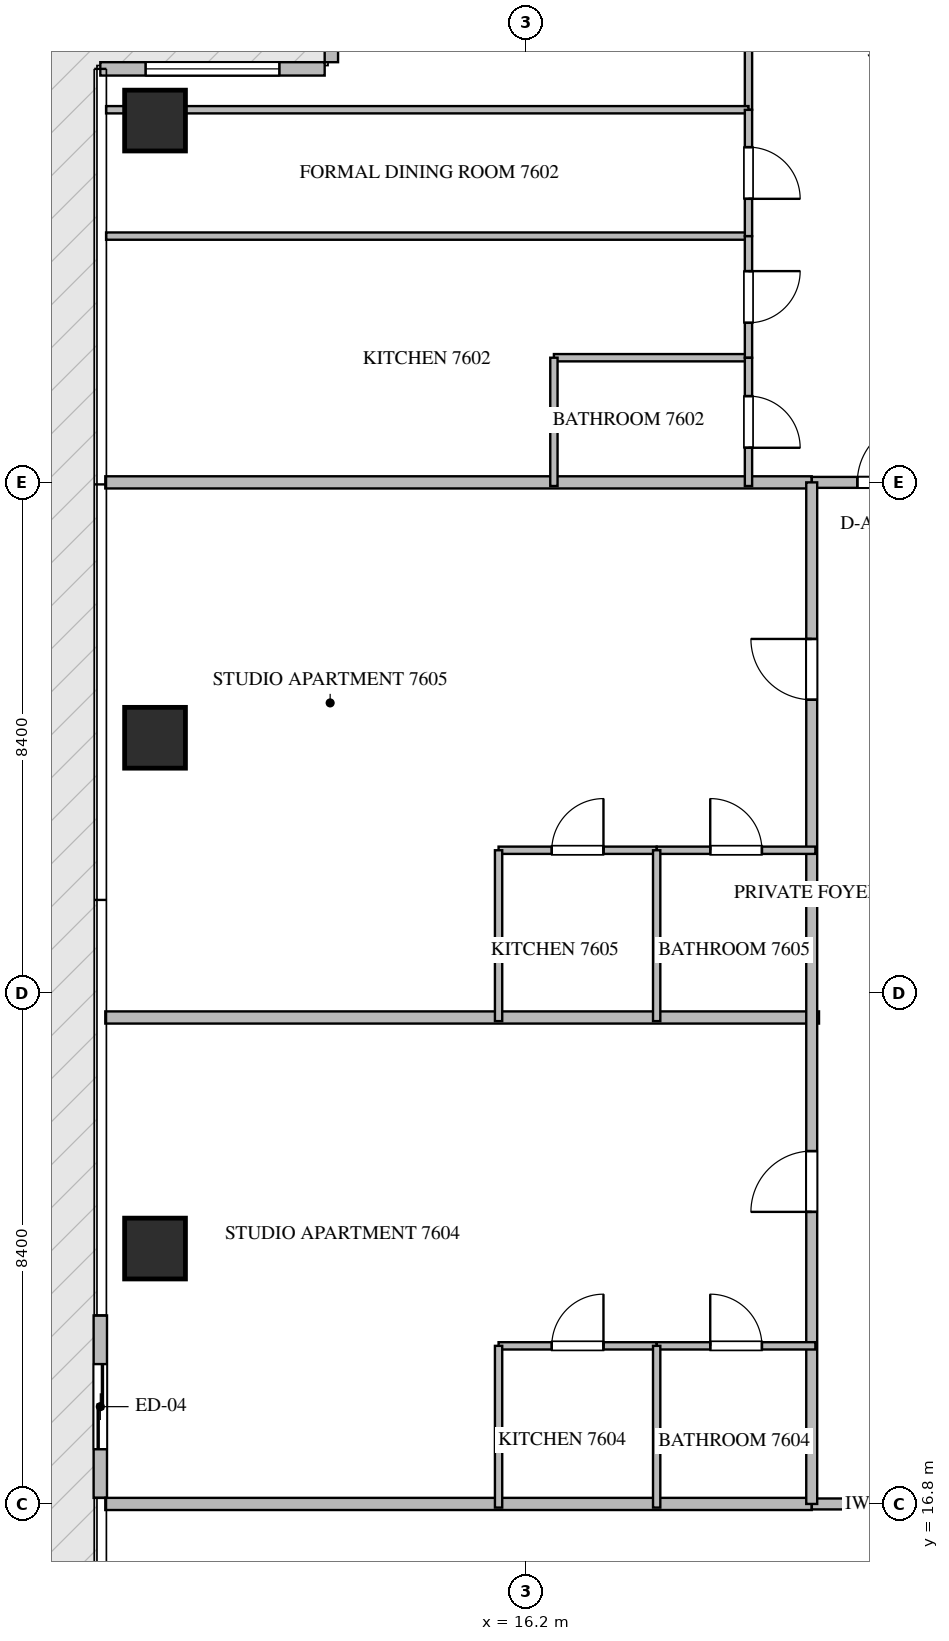
"""IFC4 building model, lengths in metres.
Left out: names, types, materials, properties, quantities, classifications, styles, units other than length and angle.
Written with IfcOpenShell. Run it as: python <this file> out.ifc"""

import sys

from ifc_helpers import new_model, si_unit, direction, frame, frame_2d, origin, origin_2d, place, context, subcontext, project, spatial, rectangle, extrude, source, transform, mapped, element, fill, save


model = new_model("IFC4")
c1 = context("Model", 3, precision=1e-05, world=origin(), true_north=direction((0.0, 1.0)))
c2 = subcontext(c1, "Body", "Model", "MODEL_VIEW")
j1 = project(units=[si_unit("LENGTHUNIT", "METRE"), si_unit("PLANEANGLEUNIT", "RADIAN")], contexts=[c1])
p1 = place(None, origin())
s1 = spatial("IfcSite", under=j1, at=p1, CompositionType="ELEMENT")
p2 = place(p1, origin())
s2 = spatial("IfcBuilding", under=s1, at=p2, CompositionType="ELEMENT")
p3 = place(p2, frame((0.0, 0.0, 305.6)))
s3 = spatial("IfcBuildingStorey", under=s2, at=p3, CompositionType="ELEMENT", Elevation=305.6)
m1 = source(origin(), c2, "Body", "SweptSolid", [
    extrude(rectangle(XDim=1.0, YDim=1.0, at=origin_2d()), origin(), (0.0, 0.0, 1.0), 4.05),
])
for number, where, z_axis, x_axis in (
    (1, (10.1, 21.0, -0.26), (0.0, 0.0, 1.0), (1.0, 0.0, 0.0)),
    (2, (10.1, 29.4, -0.26), (0.0, 0.0, 1.0), (1.0, 0.0, 0.0)),
    (3, (10.1, 39.55, -0.26), (0.0, 0.0, 1.0), (1.0, 0.0, 0.0)),
):
    element("IfcColumn", number, at=place(p3, frame(where, z_axis=z_axis, x_axis=x_axis)), inside=s3, PredefinedType="COLUMN", context=c2, shape_type="MappedRepresentation", body=[
        mapped(m1, transform((0.0, 0.0, 0.0), scale=1.0)),
    ])
p4 = place(p3, frame((13.0, 44.09, 0.0), z_axis=(0.0, 0.0, 1.0), x_axis=(0.0, -1.0, 0.0)))
e4 = element("IfcWall", 4, at=p4, inside=s3, PredefinedType="ELEMENTEDWALL", context=c2, shape_type="SweptSolid", body=[
    extrude(rectangle(XDim=3.58, YDim=0.22, at=frame_2d((1.79, 0.0))), origin(), (0.0, 0.0, 1.0), 3.775),
])
p5 = place(p4, frame((0.69, 0.0, 0.65)))
e5 = element("IfcOpeningElement", 5, at=p5, cuts=e4, PredefinedType="OPENING", context=c2, shape_type="SweptSolid", body=[
    extrude(rectangle(XDim=2.2, YDim=2.4, at=frame_2d((1.1, 1.2))), frame((0.0, 0.12, 0.0), z_axis=(0.0, -1.0, 0.0), x_axis=(1.0, 0.0, 0.0)), (0.0, 0.0, 1.0), 0.24),
])
p6 = place(p3, frame((12.89, 40.4, 0.0), z_axis=(0.0, 0.0, 1.0), x_axis=(-1.0, 0.0, 0.0)))
e6 = element("IfcWall", 6, at=p6, inside=s3, PredefinedType="ELEMENTEDWALL", context=c2, shape_type="SweptSolid", body=[
    extrude(rectangle(XDim=3.69, YDim=0.22, at=frame_2d((1.845, 0.0))), origin(), (0.0, 0.0, 1.0), 3.775),
])
p7 = place(p6, frame((0.745, 0.0, 0.65)))
e7 = element("IfcOpeningElement", 7, at=p7, cuts=e6, PredefinedType="OPENING", context=c2, shape_type="SweptSolid", body=[
    extrude(rectangle(XDim=2.2, YDim=2.4, at=frame_2d((1.1, 1.2))), frame((0.0, 0.12, 0.0), z_axis=(0.0, -1.0, 0.0), x_axis=(1.0, 0.0, 0.0)), (0.0, 0.0, 1.0), 0.24),
])
p8 = place(p3, frame((9.2, 19.9, 0.0), z_axis=(0.0, 0.0, 1.0), x_axis=(0.0, -1.0, 0.0)))
e8 = element("IfcWall", 8, at=p8, inside=s3, PredefinedType="ELEMENTEDWALL", context=c2, shape_type="SweptSolid", body=[
    extrude(rectangle(XDim=3.0, YDim=0.22, at=frame_2d((1.5, 0.0))), origin(), (0.0, 0.0, 1.0), 3.775),
])
p9 = place(p8, frame((0.8, 0.0, 0.0)))
e9 = element("IfcOpeningElement", 9, at=p9, cuts=e8, PredefinedType="OPENING", context=c2, shape_type="SweptSolid", body=[
    extrude(rectangle(XDim=1.4, YDim=2.25, at=frame_2d((0.7, 1.125))), frame((0.0, 0.12, 0.0), z_axis=(0.0, -1.0, 0.0), x_axis=(1.0, 0.0, 0.0)), (0.0, 0.0, 1.0), 0.24),
])
p10 = place(p3, frame((9.282, 24.8, 0.0), z_axis=(0.0, 0.0, 1.0), x_axis=(1.0, 0.0, 0.0)))
e10 = element("IfcWall", 10, at=p10, inside=s3, PredefinedType="PARTITIONING", context=c2, shape_type="SweptSolid", body=[
    extrude(rectangle(XDim=11.738, YDim=0.2, at=frame_2d((5.869, 0.0))), origin(), (0.0, 0.0, 1.0), 3.79),
])
for number, where, z_axis, x_axis in (
    (11, (9.282, 16.8, 0.0), (0.0, 0.0, 1.0), (1.0, 0.0, 0.0)),
    (12, (9.282, 33.6, 0.0), (0.0, 0.0, 1.0), (1.0, 0.0, 0.0)),
):
    element("IfcWall", number, at=place(p3, frame(where, z_axis=z_axis, x_axis=x_axis)), inside=s3, PredefinedType="PARTITIONING", context=c2, shape_type="SweptSolid", body=[
        extrude(rectangle(XDim=11.618, YDim=0.2, at=frame_2d((5.809, 0.0))), origin(), (0.0, 0.0, 1.0), 3.79),
    ])
p11 = place(p3, frame((20.902, 16.8, 0.0), z_axis=(0.0, 0.0, 1.0), x_axis=(1.0, 0.0, 0.0)))
e13 = element("IfcWall", 13, at=p11, inside=s3, PredefinedType="PARTITIONING", context=c2, shape_type="SweptSolid", body=[
    extrude(rectangle(XDim=2.496, YDim=0.18, at=frame_2d((1.248, 0.0))), origin(), (0.0, 0.0, 1.0), 3.79),
])
p12 = place(p3, frame((20.902, 33.6, 0.0), z_axis=(0.0, 0.0, 1.0), x_axis=(1.0, 0.0, 0.0)))
e14 = element("IfcWall", 14, at=p12, inside=s3, PredefinedType="PARTITIONING", context=c2, shape_type="SweptSolid", body=[
    extrude(rectangle(XDim=2.496, YDim=0.18, at=frame_2d((1.248, 0.0))), origin(), (0.0, 0.0, 1.0), 3.79),
])
p13 = place(p12, frame((0.748, 0.0, 0.0)))
e15 = element("IfcOpeningElement", 15, at=p13, cuts=e14, PredefinedType="OPENING", context=c2, shape_type="SweptSolid", body=[
    extrude(rectangle(XDim=1.0, YDim=2.15, at=frame_2d((0.5, 1.075))), frame((0.0, 0.1, 0.0), z_axis=(0.0, -1.0, 0.0), x_axis=(1.0, 0.0, 0.0)), (0.0, 0.0, 1.0), 0.2),
])
p14 = place(p3, frame((20.9, 16.8, 0.0), z_axis=(0.0, 0.0, 1.0), x_axis=(0.0, 1.0, 0.0)))
e16 = element("IfcWall", 16, at=p14, inside=s3, PredefinedType="PARTITIONING", context=c2, shape_type="SweptSolid", body=[
    extrude(rectangle(XDim=16.8, YDim=0.18, at=frame_2d((8.4, 0.0))), origin(), (0.0, 0.0, 1.0), 3.79),
])
p15 = place(p14, frame((4.803, 0.0, 0.0)))
e17 = element("IfcOpeningElement", 17, at=p15, cuts=e16, PredefinedType="OPENING", context=c2, shape_type="SweptSolid", body=[
    extrude(rectangle(XDim=1.0, YDim=2.15, at=frame_2d((0.5, 1.075))), frame((0.0, 0.1, 0.0), z_axis=(0.0, -1.0, 0.0), x_axis=(1.0, 0.0, 0.0)), (0.0, 0.0, 1.0), 0.2),
])
p16 = place(p14, frame((13.225, 0.0, 0.0)))
e18 = element("IfcOpeningElement", 18, at=p16, cuts=e16, PredefinedType="OPENING", context=c2, shape_type="SweptSolid", body=[
    extrude(rectangle(XDim=1.0, YDim=2.15, at=frame_2d((0.5, 1.075))), frame((0.0, 0.1, 0.0), z_axis=(0.0, -1.0, 0.0), x_axis=(1.0, 0.0, 0.0)), (0.0, 0.0, 1.0), 0.2),
])
p17 = place(p3, frame((19.86, 47.905, 0.0), z_axis=(0.0, 0.0, 1.0), x_axis=(0.0, -1.0, 0.0)))
e19 = element("IfcWall", 19, at=p17, inside=s3, PredefinedType="PARTITIONING", context=c2, shape_type="SweptSolid", body=[
    extrude(rectangle(XDim=8.177, YDim=0.12, at=frame_2d((4.088, 0.0))), origin(), (0.0, 0.0, 1.0), 3.79),
])
p18 = place(p17, frame((4.002, 0.0, 0.0)))
e20 = element("IfcOpeningElement", 20, at=p18, cuts=e19, PredefinedType="OPENING", context=c2, shape_type="SweptSolid", body=[
    extrude(rectangle(XDim=0.9, YDim=2.1, at=frame_2d((0.45, 1.05))), frame((0.0, 0.07, 0.0), z_axis=(0.0, -1.0, 0.0), x_axis=(1.0, 0.0, 0.0)), (0.0, 0.0, 1.0), 0.14),
])
p19 = place(p3, frame((9.295, 39.728, 0.0), z_axis=(0.0, 0.0, 1.0), x_axis=(1.0, 0.0, 0.0)))
e21 = element("IfcWall", 21, at=p19, inside=s3, PredefinedType="PARTITIONING", context=c2, shape_type="SweptSolid", body=[
    extrude(rectangle(XDim=10.565, YDim=0.12, at=frame_2d((5.283, 0.0))), origin(), (0.0, 0.0, 1.0), 3.292),
])
p20 = place(p3, frame((9.295, 37.65, 0.0), z_axis=(0.0, 0.0, 1.0), x_axis=(1.0, 0.0, 0.0)))
e22 = element("IfcWall", 22, at=p20, inside=s3, PredefinedType="PARTITIONING", context=c2, shape_type="SweptSolid", body=[
    extrude(rectangle(XDim=10.565, YDim=0.12, at=frame_2d((5.283, 0.0))), origin(), (0.0, 0.0, 1.0), 3.79),
])
p21 = place(p3, frame((16.66, 35.65, 0.0), z_axis=(0.0, 0.0, 1.0), x_axis=(1.0, 0.0, 0.0)))
e23 = element("IfcWall", 23, at=p21, inside=s3, PredefinedType="PARTITIONING", context=c2, shape_type="SweptSolid", body=[
    extrude(rectangle(XDim=3.2, YDim=0.12, at=frame_2d((1.6, 0.0))), origin(), (0.0, 0.0, 1.0), 3.79),
])
p22 = place(p3, frame((16.66, 35.65, 0.0), z_axis=(0.0, 0.0, 1.0), x_axis=(0.0, -1.0, 0.0)))
e24 = element("IfcWall", 24, at=p22, inside=s3, PredefinedType="PARTITIONING", context=c2, shape_type="SweptSolid", body=[
    extrude(rectangle(XDim=2.11, YDim=0.12, at=frame_2d((1.055, 0.0))), origin(), (0.0, 0.0, 1.0), 3.79),
])
p23 = place(p3, frame((19.86, 39.726, 0.0), z_axis=(0.0, 0.0, 1.0), x_axis=(0.0, -1.0, 0.0)))
e25 = element("IfcWall", 25, at=p23, inside=s3, PredefinedType="PARTITIONING", context=c2, shape_type="SweptSolid", body=[
    extrude(rectangle(XDim=2.076, YDim=0.12, at=frame_2d((1.038, 0.0))), origin(), (0.0, 0.0, 1.0), 3.79),
])
p24 = place(p23, frame((0.613, 0.0, 0.0)))
e26 = element("IfcOpeningElement", 26, at=p24, cuts=e25, PredefinedType="OPENING", context=c2, shape_type="SweptSolid", body=[
    extrude(rectangle(XDim=0.85, YDim=2.1, at=frame_2d((0.425, 1.05))), frame((0.0, 0.07, 0.0), z_axis=(0.0, -1.0, 0.0), x_axis=(1.0, 0.0, 0.0)), (0.0, 0.0, 1.0), 0.14),
])
p25 = place(p3, frame((19.86, 37.648, 0.0), z_axis=(0.0, 0.0, 1.0), x_axis=(0.0, -1.0, 0.0)))
e27 = element("IfcWall", 27, at=p25, inside=s3, PredefinedType="PARTITIONING", context=c2, shape_type="SweptSolid", body=[
    extrude(rectangle(XDim=1.998, YDim=0.12, at=frame_2d((0.999, 0.0))), origin(), (0.0, 0.0, 1.0), 3.79),
])
p26 = place(p25, frame((0.574, 0.0, 0.0)))
e28 = element("IfcOpeningElement", 28, at=p26, cuts=e27, PredefinedType="OPENING", context=c2, shape_type="SweptSolid", body=[
    extrude(rectangle(XDim=0.85, YDim=2.1, at=frame_2d((0.425, 1.05))), frame((0.0, 0.07, 0.0), z_axis=(0.0, -1.0, 0.0), x_axis=(1.0, 0.0, 0.0)), (0.0, 0.0, 1.0), 0.14),
])
p27 = place(p3, frame((19.86, 35.648, 0.0), z_axis=(0.0, 0.0, 1.0), x_axis=(0.0, -1.0, 0.0)))
e29 = element("IfcWall", 29, at=p27, inside=s3, PredefinedType="PARTITIONING", context=c2, shape_type="SweptSolid", body=[
    extrude(rectangle(XDim=2.108, YDim=0.12, at=frame_2d((1.054, 0.0))), origin(), (0.0, 0.0, 1.0), 3.79),
])
p28 = place(p27, frame((0.629, 0.0, 0.0)))
e30 = element("IfcOpeningElement", 30, at=p28, cuts=e29, PredefinedType="OPENING", context=c2, shape_type="SweptSolid", body=[
    extrude(rectangle(XDim=0.85, YDim=2.1, at=frame_2d((0.425, 1.05))), frame((0.0, 0.07, 0.0), z_axis=(0.0, -1.0, 0.0), x_axis=(1.0, 0.0, 0.0)), (0.0, 0.0, 1.0), 0.14),
])
p29 = place(p3, frame((15.75, 19.4, 0.0), z_axis=(0.0, 0.0, 1.0), x_axis=(1.0, 0.0, 0.0)))
e31 = element("IfcWall", 31, at=p29, inside=s3, PredefinedType="PARTITIONING", context=c2, shape_type="SweptSolid", body=[
    extrude(rectangle(XDim=2.6, YDim=0.12, at=frame_2d((1.3, 0.0))), origin(), (0.0, 0.0, 1.0), 3.79),
])
p30 = place(p29, frame((0.875, 0.0, 0.0)))
e32 = element("IfcOpeningElement", 32, at=p30, cuts=e31, PredefinedType="OPENING", context=c2, shape_type="SweptSolid", body=[
    extrude(rectangle(XDim=0.85, YDim=2.1, at=frame_2d((0.425, 1.05))), frame((0.0, 0.07, 0.0), z_axis=(0.0, -1.0, 0.0), x_axis=(1.0, 0.0, 0.0)), (0.0, 0.0, 1.0), 0.14),
])
p31 = place(p3, frame((18.352, 19.4, 0.0), z_axis=(0.0, 0.0, 1.0), x_axis=(1.0, 0.0, 0.0)))
e33 = element("IfcWall", 33, at=p31, inside=s3, PredefinedType="PARTITIONING", context=c2, shape_type="SweptSolid", body=[
    extrude(rectangle(XDim=2.608, YDim=0.12, at=frame_2d((1.304, 0.0))), origin(), (0.0, 0.0, 1.0), 3.79),
])
p32 = place(p31, frame((0.879, 0.0, 0.0)))
e34 = element("IfcOpeningElement", 34, at=p32, cuts=e33, PredefinedType="OPENING", context=c2, shape_type="SweptSolid", body=[
    extrude(rectangle(XDim=0.85, YDim=2.1, at=frame_2d((0.425, 1.05))), frame((0.0, 0.07, 0.0), z_axis=(0.0, -1.0, 0.0), x_axis=(1.0, 0.0, 0.0)), (0.0, 0.0, 1.0), 0.14),
])
for number, where, z_axis, x_axis in (
    (35, (18.35, 16.74, 0.0), (0.0, 0.0, 1.0), (0.0, 1.0, 0.0)),
    (36, (15.75, 16.74, 0.0), (0.0, 0.0, 1.0), (0.0, 1.0, 0.0)),
):
    element("IfcWall", number, at=place(p3, frame(where, z_axis=z_axis, x_axis=x_axis)), inside=s3, PredefinedType="PARTITIONING", context=c2, shape_type="SweptSolid", body=[
        extrude(rectangle(XDim=2.66, YDim=0.12, at=frame_2d((1.33, 0.0))), origin(), (0.0, 0.0, 1.0), 3.79),
    ])
p33 = place(p3, frame((15.75, 27.55, 0.0), z_axis=(0.0, 0.0, 1.0), x_axis=(1.0, 0.0, 0.0)))
e37 = element("IfcWall", 37, at=p33, inside=s3, PredefinedType="PARTITIONING", context=c2, shape_type="SweptSolid", body=[
    extrude(rectangle(XDim=2.6, YDim=0.12, at=frame_2d((1.3, 0.0))), origin(), (0.0, 0.0, 1.0), 3.79),
])
p34 = place(p33, frame((0.875, 0.0, 0.0)))
e38 = element("IfcOpeningElement", 38, at=p34, cuts=e37, PredefinedType="OPENING", context=c2, shape_type="SweptSolid", body=[
    extrude(rectangle(XDim=0.85, YDim=2.1, at=frame_2d((0.425, 1.05))), frame((0.0, 0.07, 0.0), z_axis=(0.0, -1.0, 0.0), x_axis=(1.0, 0.0, 0.0)), (0.0, 0.0, 1.0), 0.14),
])
p35 = place(p3, frame((18.352, 27.55, 0.0), z_axis=(0.0, 0.0, 1.0), x_axis=(1.0, 0.0, 0.0)))
e39 = element("IfcWall", 39, at=p35, inside=s3, PredefinedType="PARTITIONING", context=c2, shape_type="SweptSolid", body=[
    extrude(rectangle(XDim=2.608, YDim=0.12, at=frame_2d((1.304, 0.0))), origin(), (0.0, 0.0, 1.0), 3.79),
])
p36 = place(p35, frame((0.879, 0.0, 0.0)))
e40 = element("IfcOpeningElement", 40, at=p36, cuts=e39, PredefinedType="OPENING", context=c2, shape_type="SweptSolid", body=[
    extrude(rectangle(XDim=0.85, YDim=2.1, at=frame_2d((0.425, 1.05))), frame((0.0, 0.07, 0.0), z_axis=(0.0, -1.0, 0.0), x_axis=(1.0, 0.0, 0.0)), (0.0, 0.0, 1.0), 0.14),
])
for number, where, z_axis, x_axis in (
    (41, (18.35, 24.74, 0.0), (0.0, 0.0, 1.0), (0.0, 1.0, 0.0)),
    (42, (15.75, 24.74, 0.0), (0.0, 0.0, 1.0), (0.0, 1.0, 0.0)),
):
    element("IfcWall", number, at=place(p3, frame(where, z_axis=z_axis, x_axis=x_axis)), inside=s3, PredefinedType="PARTITIONING", context=c2, shape_type="SweptSolid", body=[
        extrude(rectangle(XDim=2.81, YDim=0.12, at=frame_2d((1.405, 0.0))), origin(), (0.0, 0.0, 1.0), 3.79),
    ])
m2 = source(origin(), c2, "Body", "SweptSolid", [
    extrude(rectangle(XDim=2.2, YDim=2.4, at=frame_2d((1.1, 1.2))), frame((0.0, 0.03, 0.0), z_axis=(0.0, -1.0, 0.0), x_axis=(1.0, 0.0, 0.0)), (0.0, 0.0, 1.0), 0.06),
])
p37 = place(p7, origin())
e43 = element("IfcWindow", 43, at=p37, inside=s3, PartitioningType="SINGLE_PANEL", PredefinedType="WINDOW", context=c2, shape_type="MappedRepresentation", body=[
    mapped(m2, transform((0.0, 0.0, 0.0), scale=1.0)),
])
fill(e7, e43)
m3 = source(origin(), c2, "Body", "SweptSolid", [
    extrude(rectangle(XDim=1.4, YDim=2.25, at=frame_2d((0.7, 1.125))), frame((0.0, 0.025, 0.0), z_axis=(0.0, -1.0, 0.0), x_axis=(1.0, 0.0, 0.0)), (0.0, 0.0, 1.0), 0.05),
])
p38 = place(p9, origin())
e44 = element("IfcDoor", 44, at=p38, inside=s3, OperationType="SLIDING_TO_LEFT", PredefinedType="DOOR", context=c2, shape_type="MappedRepresentation", body=[
    mapped(m3, transform((0.0, 0.0, 0.0), scale=1.0)),
])
fill(e9, e44)
m4 = source(origin(), c2, "Body", "SweptSolid", [
    extrude(rectangle(XDim=1.0, YDim=2.15, at=frame_2d((0.5, 1.075))), frame((0.0, 0.025, 0.0), z_axis=(0.0, -1.0, 0.0), x_axis=(1.0, 0.0, 0.0)), (0.0, 0.0, 1.0), 0.05),
])
p39 = place(p13, origin())
e45 = element("IfcDoor", 45, at=p39, inside=s3, OperationType="SINGLE_SWING_RIGHT", PredefinedType="DOOR", context=c2, shape_type="MappedRepresentation", body=[
    mapped(m4, transform((0.0, 0.0, 0.0), scale=1.0)),
])
fill(e15, e45)
p40 = place(p15, origin())
e46 = element("IfcDoor", 46, at=p40, inside=s3, OperationType="SINGLE_SWING_LEFT", PredefinedType="DOOR", context=c2, shape_type="MappedRepresentation", body=[
    mapped(m4, transform((0.0, 0.0, 0.0), scale=1.0)),
])
fill(e17, e46)
p41 = place(p16, origin())
e47 = element("IfcDoor", 47, at=p41, inside=s3, OperationType="SINGLE_SWING_RIGHT", PredefinedType="DOOR", context=c2, shape_type="MappedRepresentation", body=[
    mapped(m4, transform((0.0, 0.0, 0.0), scale=1.0)),
])
fill(e18, e47)
m5 = source(origin(), c2, "Body", "SweptSolid", [
    extrude(rectangle(XDim=0.85, YDim=2.1, at=frame_2d((0.425, 1.05))), frame((0.0, 0.025, 0.0), z_axis=(0.0, -1.0, 0.0), x_axis=(1.0, 0.0, 0.0)), (0.0, 0.0, 1.0), 0.05),
])
p42 = place(p24, origin())
e48 = element("IfcDoor", 48, at=p42, inside=s3, OperationType="SINGLE_SWING_RIGHT", PredefinedType="DOOR", context=c2, shape_type="MappedRepresentation", body=[
    mapped(m5, transform((0.0, 0.0, 0.0), scale=1.0)),
])
fill(e26, e48)
p43 = place(p26, origin())
e49 = element("IfcDoor", 49, at=p43, inside=s3, OperationType="SINGLE_SWING_LEFT", PredefinedType="DOOR", context=c2, shape_type="MappedRepresentation", body=[
    mapped(m5, transform((0.0, 0.0, 0.0), scale=1.0)),
])
fill(e28, e49)
p44 = place(p28, origin())
e50 = element("IfcDoor", 50, at=p44, inside=s3, OperationType="SINGLE_SWING_RIGHT", PredefinedType="DOOR", context=c2, shape_type="MappedRepresentation", body=[
    mapped(m5, transform((0.0, 0.0, 0.0), scale=1.0)),
])
fill(e30, e50)
p45 = place(p30, origin())
e51 = element("IfcDoor", 51, at=p45, inside=s3, OperationType="SINGLE_SWING_RIGHT", PredefinedType="DOOR", context=c2, shape_type="MappedRepresentation", body=[
    mapped(m5, transform((0.0, 0.0, 0.0), scale=1.0)),
])
fill(e32, e51)
p46 = place(p32, origin())
e52 = element("IfcDoor", 52, at=p46, inside=s3, OperationType="SINGLE_SWING_LEFT", PredefinedType="DOOR", context=c2, shape_type="MappedRepresentation", body=[
    mapped(m5, transform((0.0, 0.0, 0.0), scale=1.0)),
])
fill(e34, e52)
p47 = place(p34, origin())
e53 = element("IfcDoor", 53, at=p47, inside=s3, OperationType="SINGLE_SWING_RIGHT", PredefinedType="DOOR", context=c2, shape_type="MappedRepresentation", body=[
    mapped(m5, transform((0.0, 0.0, 0.0), scale=1.0)),
])
fill(e38, e53)
p48 = place(p36, origin())
e54 = element("IfcDoor", 54, at=p48, inside=s3, OperationType="SINGLE_SWING_LEFT", PredefinedType="DOOR", context=c2, shape_type="MappedRepresentation", body=[
    mapped(m5, transform((0.0, 0.0, 0.0), scale=1.0)),
])
fill(e40, e54)
save(model, sys.argv[1])
